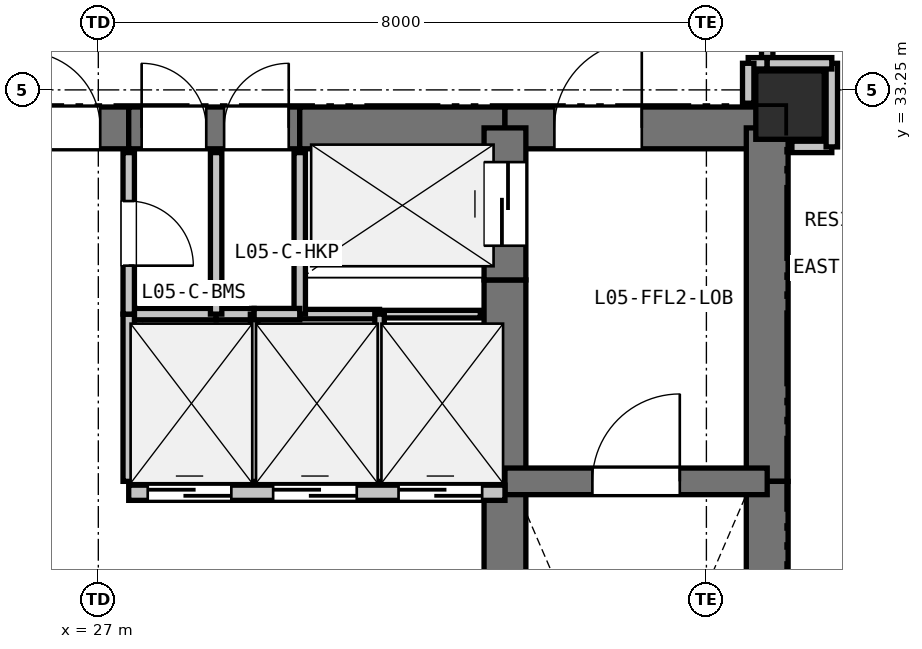
"""IFC4 building model, lengths in metres.
Left out: names, types, materials, properties, quantities, classifications, styles, units other than length and angle.
Written with IfcOpenShell. Run it as: python <this file> out.ifc"""

import sys

from ifc_helpers import new_model, si_unit, direction, frame, frame_2d, origin, origin_2d, place, context, subcontext, project, spatial, rectangle, extrude, element, fill, save


model = new_model("IFC4")
c1 = context("Model", 3, precision=1e-05, world=origin(), true_north=direction((0.0, 1.0)))
c2 = subcontext(c1, "Body", "Model", "MODEL_VIEW")
j1 = project(units=[si_unit("LENGTHUNIT", "METRE"), si_unit("PLANEANGLEUNIT", "RADIAN")], contexts=[c1])
p1 = place(None, origin())
s1 = spatial("IfcSite", under=j1, at=p1, CompositionType="ELEMENT")
p2 = place(p1, origin())
s2 = spatial("IfcBuilding", under=s1, at=p2, CompositionType="ELEMENT")
p3 = place(p2, frame((0.0, 0.0, 22.5)))
s3 = spatial("IfcBuildingStorey", under=s2, at=p3, CompositionType="ELEMENT", Elevation=22.5)
p4 = place(p3, frame((36.1, 33.05, 0.0), z_axis=(0.0, 0.0, 1.0), x_axis=(1.0, 0.0, 0.0)))
e1 = element("IfcColumn", 1, at=p4, inside=s3, PredefinedType="COLUMN", context=c2, shape_type="SweptSolid", body=[
    extrude(rectangle(XDim=0.9, YDim=0.9, at=origin_2d()), origin(), (0.0, 0.0, 1.0), 3.3),
])
p5 = place(p3, frame((25.65, 32.75, 0.0), z_axis=(0.0, 0.0, 1.0), x_axis=(1.0, 0.0, 0.0)))
e2 = element("IfcWall", 2, at=p5, inside=s3, PredefinedType="SHEAR", context=c2, shape_type="SweptSolid", body=[
    extrude(rectangle(XDim=1.75, YDim=0.55, at=frame_2d((0.875, 0.0))), origin(), (0.0, 0.0, 1.0), 3.04),
])
p6 = place(p5, frame((0.375, 0.0, 0.0)))
e3 = element("IfcOpeningElement", 3, at=p6, cuts=e2, PredefinedType="OPENING", context=c2, shape_type="SweptSolid", body=[
    extrude(rectangle(XDim=1.0, YDim=2.15, at=frame_2d((0.5, 1.075))), frame((0.0, 0.285, 0.0), z_axis=(0.0, -1.0, 0.0), x_axis=(1.0, 0.0, 0.0)), (0.0, 0.0, 1.0), 0.57),
])
p7 = place(p3, frame((27.4, 32.75, 0.0), z_axis=(0.0, 0.0, 1.0), x_axis=(1.0, 0.0, 0.0)))
e4 = element("IfcWall", 4, at=p7, inside=s3, PredefinedType="SHEAR", context=c2, shape_type="SweptSolid", body=[
    extrude(rectangle(XDim=2.25, YDim=0.55, at=frame_2d((1.125, 0.0))), origin(), (0.0, 0.0, 1.0), 3.04),
])
p8 = place(p7, frame((0.17, 0.0, 0.0)))
e5 = element("IfcOpeningElement", 5, at=p8, cuts=e4, PredefinedType="OPENING", context=c2, shape_type="SweptSolid", body=[
    extrude(rectangle(XDim=0.85, YDim=2.1, at=frame_2d((0.425, 1.05))), frame((0.0, 0.285, 0.0), z_axis=(0.0, -1.0, 0.0), x_axis=(1.0, 0.0, 0.0)), (0.0, 0.0, 1.0), 0.57),
])
p9 = place(p7, frame((1.255, 0.0, 0.0)))
e6 = element("IfcOpeningElement", 6, at=p9, cuts=e4, PredefinedType="OPENING", context=c2, shape_type="SweptSolid", body=[
    extrude(rectangle(XDim=0.85, YDim=2.1, at=frame_2d((0.425, 1.05))), frame((0.0, 0.285, 0.0), z_axis=(0.0, -1.0, 0.0), x_axis=(1.0, 0.0, 0.0)), (0.0, 0.0, 1.0), 0.57),
])
p10 = place(p3, frame((29.65, 32.75, 0.0), z_axis=(0.0, 0.0, 1.0), x_axis=(1.0, 0.0, 0.0)))
e7 = element("IfcWall", 7, at=p10, inside=s3, PredefinedType="SHEAR", context=c2, shape_type="SweptSolid", body=[
    extrude(rectangle(XDim=2.7, YDim=0.55, at=frame_2d((1.35, 0.0))), origin(), (0.0, 0.0, 1.0), 3.04),
])
p11 = place(p3, frame((32.35, 32.75, 0.0), z_axis=(0.0, 0.0, 1.0), x_axis=(1.0, 0.0, 0.0)))
e8 = element("IfcWall", 8, at=p11, inside=s3, PredefinedType="SHEAR", context=c2, shape_type="SweptSolid", body=[
    extrude(rectangle(XDim=3.45, YDim=0.55, at=frame_2d((1.725, 0.0))), origin(), (0.0, 0.0, 1.0), 3.04),
])
p12 = place(p11, frame((0.65, 0.0, 0.0)))
e9 = element("IfcOpeningElement", 9, at=p12, cuts=e8, PredefinedType="OPENING", context=c2, shape_type="SweptSolid", body=[
    extrude(rectangle(XDim=1.15, YDim=2.15, at=frame_2d((0.575, 1.075))), frame((0.0, 0.285, 0.0), z_axis=(0.0, -1.0, 0.0), x_axis=(1.0, 0.0, 0.0)), (0.0, 0.0, 1.0), 0.57),
])
p13 = place(p3, frame((35.8, 32.75, 0.0), z_axis=(0.0, 0.0, 1.0), x_axis=(0.0, -1.0, 0.0)))
e10 = element("IfcWall", 10, at=p13, inside=s3, PredefinedType="SHEAR", context=c2, shape_type="SweptSolid", body=[
    extrude(rectangle(XDim=4.65, YDim=0.55, at=frame_2d((2.325, 0.0))), origin(), (0.0, 0.0, 1.0), 3.04),
])
p14 = place(p3, frame((35.8, 28.1, 0.0), z_axis=(0.0, 0.0, 1.0), x_axis=(0.0, -1.0, 0.0)))
e11 = element("IfcWall", 11, at=p14, inside=s3, PredefinedType="SHEAR", context=c2, shape_type="SweptSolid", body=[
    extrude(rectangle(XDim=7.35, YDim=0.55, at=frame_2d((3.675, 0.0))), origin(), (0.0, 0.0, 1.0), 3.04),
])
p15 = place(p3, frame((32.35, 25.55, 0.0), z_axis=(0.0, 0.0, 1.0), x_axis=(0.0, 1.0, 0.0)))
e12 = element("IfcWall", 12, at=p15, inside=s3, PredefinedType="SHEAR", context=c2, shape_type="SweptSolid", body=[
    extrude(rectangle(XDim=2.4, YDim=0.55, at=frame_2d((1.2, 0.0))), origin(), (0.0, 0.0, 1.0), 3.04),
])
p16 = place(p3, frame((32.35, 27.95, 0.0), z_axis=(0.0, 0.0, 1.0), x_axis=(0.0, 1.0, 0.0)))
e13 = element("IfcWall", 13, at=p16, inside=s3, PredefinedType="SHEAR", context=c2, shape_type="SweptSolid", body=[
    extrude(rectangle(XDim=2.8, YDim=0.55, at=frame_2d((1.4, 0.0))), origin(), (0.0, 0.0, 1.0), 3.04),
])
p17 = place(p3, frame((32.35, 30.75, 0.0), z_axis=(0.0, 0.0, 1.0), x_axis=(0.0, 1.0, 0.0)))
e14 = element("IfcWall", 14, at=p17, inside=s3, PredefinedType="SHEAR", context=c2, shape_type="SweptSolid", body=[
    extrude(rectangle(XDim=2.0, YDim=0.55, at=frame_2d((1.0, 0.0))), origin(), (0.0, 0.0, 1.0), 3.04),
])
p18 = place(p17, frame((0.45, 0.0, 0.0)))
e15 = element("IfcOpeningElement", 15, at=p18, cuts=e14, PredefinedType="OPENING", context=c2, shape_type="SweptSolid", body=[
    extrude(rectangle(XDim=1.1, YDim=2.15, at=frame_2d((0.55, 1.075))), frame((0.0, 0.285, 0.0), z_axis=(0.0, -1.0, 0.0), x_axis=(1.0, 0.0, 0.0)), (0.0, 0.0, 1.0), 0.57),
])
p19 = place(p3, frame((32.35, 28.1, 0.0), z_axis=(0.0, 0.0, 1.0), x_axis=(1.0, 0.0, 0.0)))
e16 = element("IfcWall", 16, at=p19, inside=s3, PredefinedType="SHEAR", context=c2, shape_type="SweptSolid", body=[
    extrude(rectangle(XDim=3.45, YDim=0.35, at=frame_2d((1.725, 0.0))), origin(), (0.0, 0.0, 1.0), 3.04),
])
p20 = place(p19, frame((1.15, 0.0, 0.0)))
e17 = element("IfcOpeningElement", 17, at=p20, cuts=e16, PredefinedType="OPENING", context=c2, shape_type="SweptSolid", body=[
    extrude(rectangle(XDim=1.15, YDim=2.15, at=frame_2d((0.575, 1.075))), frame((0.0, 0.185, 0.0), z_axis=(0.0, -1.0, 0.0), x_axis=(1.0, 0.0, 0.0)), (0.0, 0.0, 1.0), 0.37),
])
p21 = place(p3, frame((27.4, 27.95, 0.0), z_axis=(0.0, 0.0, 1.0), x_axis=(1.0, 0.0, 0.0)))
e18 = element("IfcWall", 18, at=p21, inside=s3, PredefinedType="PARTITIONING", context=c2, shape_type="SweptSolid", body=[
    extrude(rectangle(XDim=4.95, YDim=0.2, at=frame_2d((2.475, 0.0))), origin(), (0.0, 0.0, 1.0), 3.04),
])
p22 = place(p21, frame((0.25, 0.0, 0.0)))
e19 = element("IfcOpeningElement", 19, at=p22, cuts=e18, PredefinedType="OPENING", context=c2, shape_type="SweptSolid", body=[
    extrude(rectangle(XDim=1.1, YDim=2.15, at=frame_2d((0.55, 1.075))), frame((0.0, 0.11, 0.0), z_axis=(0.0, -1.0, 0.0), x_axis=(1.0, 0.0, 0.0)), (0.0, 0.0, 1.0), 0.22),
])
p23 = place(p21, frame((1.9, 0.0, 0.0)))
e20 = element("IfcOpeningElement", 20, at=p23, cuts=e18, PredefinedType="OPENING", context=c2, shape_type="SweptSolid", body=[
    extrude(rectangle(XDim=1.1, YDim=2.15, at=frame_2d((0.55, 1.075))), frame((0.0, 0.11, 0.0), z_axis=(0.0, -1.0, 0.0), x_axis=(1.0, 0.0, 0.0)), (0.0, 0.0, 1.0), 0.22),
])
p24 = place(p21, frame((3.55, 0.0, 0.0)))
e21 = element("IfcOpeningElement", 21, at=p24, cuts=e18, PredefinedType="OPENING", context=c2, shape_type="SweptSolid", body=[
    extrude(rectangle(XDim=1.1, YDim=2.15, at=frame_2d((0.55, 1.075))), frame((0.0, 0.11, 0.0), z_axis=(0.0, -1.0, 0.0), x_axis=(1.0, 0.0, 0.0)), (0.0, 0.0, 1.0), 0.22),
])
p25 = place(p3, frame((32.025, 30.3, 0.0), z_axis=(0.0, 0.0, 1.0), x_axis=(-1.0, 0.0, 0.0)))
e22 = element("IfcWall", 22, at=p25, inside=s3, PredefinedType="PARTITIONING", context=c2, shape_type="SweptSolid", body=[
    extrude(rectangle(XDim=1.325, YDim=0.1, at=frame_2d((0.663, 0.0))), origin(), (0.0, 0.0, 1.0), 3.04),
])
p26 = place(p3, frame((30.7, 30.3, 0.0), z_axis=(0.0, 0.0, 1.0), x_axis=(-1.0, 0.0, 0.0)))
e23 = element("IfcWall", 23, at=p26, inside=s3, PredefinedType="PARTITIONING", context=c2, shape_type="SweptSolid", body=[
    extrude(rectangle(XDim=1.05, YDim=0.125, at=frame_2d((0.525, 0.0))), origin(), (0.0, 0.0, 1.0), 3.04),
])
p27 = place(p3, frame((29.65, 30.3, 0.0), z_axis=(0.0, 0.0, 1.0), x_axis=(0.0, 1.0, 0.0)))
e24 = element("IfcWall", 24, at=p27, inside=s3, PredefinedType="PARTITIONING", context=c2, shape_type="SweptSolid", body=[
    extrude(rectangle(XDim=2.125, YDim=0.15, at=frame_2d((1.062, 0.0))), origin(), (0.0, 0.0, 1.0), 3.04),
])
p28 = place(p3, frame((27.4, 30.3, 0.0), z_axis=(0.0, 0.0, 1.0), x_axis=(1.0, 0.0, 0.0)))
e25 = element("IfcWall", 25, at=p28, inside=s3, PredefinedType="PARTITIONING", context=c2, shape_type="SweptSolid", body=[
    extrude(rectangle(XDim=1.15, YDim=0.15, at=frame_2d((0.575, 0.0))), origin(), (0.0, 0.0, 1.0), 3.04),
])
p29 = place(p3, frame((28.55, 30.3, 0.0), z_axis=(0.0, 0.0, 1.0), x_axis=(1.0, 0.0, 0.0)))
e26 = element("IfcWall", 26, at=p29, inside=s3, PredefinedType="PARTITIONING", context=c2, shape_type="SweptSolid", body=[
    extrude(rectangle(XDim=0.5, YDim=0.15, at=frame_2d((0.25, 0.0))), origin(), (0.0, 0.0, 1.0), 3.04),
])
p30 = place(p3, frame((29.05, 30.3, 0.0), z_axis=(0.0, 0.0, 1.0), x_axis=(0.0, -1.0, 0.0)))
e27 = element("IfcWall", 27, at=p30, inside=s3, PredefinedType="PARTITIONING", context=c2, shape_type="SweptSolid", body=[
    extrude(rectangle(XDim=2.2, YDim=0.1, at=frame_2d((1.1, 0.0))), origin(), (0.0, 0.0, 1.0), 3.04),
])
p31 = place(p3, frame((27.4, 28.1, 0.0), z_axis=(0.0, 0.0, 1.0), x_axis=(0.0, 1.0, 0.0)))
e28 = element("IfcWall", 28, at=p31, inside=s3, PredefinedType="PARTITIONING", context=c2, shape_type="SweptSolid", body=[
    extrude(rectangle(XDim=2.2, YDim=0.15, at=frame_2d((1.1, 0.0))), origin(), (0.0, 0.0, 1.0), 3.04),
])
p32 = place(p3, frame((29.05, 30.3, 0.0), z_axis=(0.0, 0.0, 1.0), x_axis=(1.0, 0.0, 0.0)))
e29 = element("IfcWall", 29, at=p32, inside=s3, PredefinedType="PARTITIONING", context=c2, shape_type="SweptSolid", body=[
    extrude(rectangle(XDim=0.6, YDim=0.15, at=frame_2d((0.3, 0.0))), origin(), (0.0, 0.0, 1.0), 3.04),
])
p33 = place(p3, frame((30.7, 30.3, 0.0), z_axis=(0.0, 0.0, 1.0), x_axis=(0.0, -1.0, 0.0)))
e30 = element("IfcWall", 30, at=p33, inside=s3, PredefinedType="PARTITIONING", context=c2, shape_type="SweptSolid", body=[
    extrude(rectangle(XDim=2.2, YDim=0.125, at=frame_2d((1.1, 0.0))), origin(), (0.0, 0.0, 1.0), 3.04),
])
p34 = place(p3, frame((27.4, 32.425, 0.0), z_axis=(0.0, 0.0, 1.0), x_axis=(0.0, -1.0, 0.0)))
e31 = element("IfcWall", 31, at=p34, inside=s3, PredefinedType="PARTITIONING", context=c2, shape_type="SweptSolid", body=[
    extrude(rectangle(XDim=2.125, YDim=0.15, at=frame_2d((1.062, 0.0))), origin(), (0.0, 0.0, 1.0), 3.04),
])
p35 = place(p34, frame((0.637, 0.0, 0.0)))
e32 = element("IfcOpeningElement", 32, at=p35, cuts=e31, PredefinedType="OPENING", context=c2, shape_type="SweptSolid", body=[
    extrude(rectangle(XDim=0.85, YDim=2.1, at=frame_2d((0.425, 1.05))), frame((0.0, 0.085, 0.0), z_axis=(0.0, -1.0, 0.0), x_axis=(1.0, 0.0, 0.0)), (0.0, 0.0, 1.0), 0.17),
])
p36 = place(p3, frame((35.8, 35.35, 0.0), z_axis=(0.0, 0.0, 1.0), x_axis=(0.0, -1.0, 0.0)))
e33 = element("IfcWall", 33, at=p36, inside=s3, PredefinedType="PARTITIONING", context=c2, shape_type="SweptSolid", body=[
    extrude(rectangle(XDim=1.75, YDim=0.15, at=frame_2d((0.875, 0.0))), origin(), (0.0, 0.0, 1.0), 3.04),
])
p37 = place(p36, frame((0.375, 0.0, 0.0)))
e34 = element("IfcOpeningElement", 34, at=p37, cuts=e33, PredefinedType="OPENING", context=c2, shape_type="SweptSolid", body=[
    extrude(rectangle(XDim=1.0, YDim=2.15, at=frame_2d((0.5, 1.075))), frame((0.0, 0.085, 0.0), z_axis=(0.0, -1.0, 0.0), x_axis=(1.0, 0.0, 0.0)), (0.0, 0.0, 1.0), 0.17),
])
p38 = place(p3, frame((35.8, 33.6, 0.0), z_axis=(0.0, 0.0, 1.0), x_axis=(-1.0, 0.0, 0.0)))
e35 = element("IfcWall", 35, at=p38, inside=s3, PredefinedType="PARTITIONING", context=c2, shape_type="SweptSolid", body=[
    extrude(rectangle(XDim=0.25, YDim=0.15, at=frame_2d((0.125, 0.0))), origin(), (0.0, 0.0, 1.0), 3.04),
])
p39 = place(p3, frame((35.55, 33.6, 0.0), z_axis=(0.0, 0.0, 1.0), x_axis=(0.0, -1.0, 0.0)))
e36 = element("IfcWall", 36, at=p39, inside=s3, PredefinedType="PARTITIONING", context=c2, shape_type="SweptSolid", body=[
    extrude(rectangle(XDim=0.525, YDim=0.15, at=frame_2d((0.263, 0.0))), origin(), (0.0, 0.0, 1.0), 2.488),
])
p40 = place(p3, frame((36.125, 32.5, 0.0), z_axis=(0.0, 0.0, 1.0), x_axis=(1.0, 0.0, 0.0)))
e37 = element("IfcWall", 37, at=p40, inside=s3, PredefinedType="PARTITIONING", context=c2, shape_type="SweptSolid", body=[
    extrude(rectangle(XDim=0.525, YDim=0.15, at=frame_2d((0.262, 0.0))), origin(), (0.0, 0.0, 1.0), 2.488),
])
p41 = place(p3, frame((36.65, 32.5, 0.0), z_axis=(0.0, 0.0, 1.0), x_axis=(0.0, 1.0, 0.0)))
e38 = element("IfcWall", 38, at=p41, inside=s3, PredefinedType="PARTITIONING", context=c2, shape_type="SweptSolid", body=[
    extrude(rectangle(XDim=1.1, YDim=0.15, at=frame_2d((0.55, 0.0))), origin(), (0.0, 0.0, 1.0), 2.337),
])
p42 = place(p3, frame((36.65, 33.6, 0.0), z_axis=(0.0, 0.0, 1.0), x_axis=(-1.0, 0.0, 0.0)))
e39 = element("IfcWall", 39, at=p42, inside=s3, PredefinedType="PARTITIONING", context=c2, shape_type="SweptSolid", body=[
    extrude(rectangle(XDim=0.85, YDim=0.15, at=frame_2d((0.425, 0.0))), origin(), (0.0, 0.0, 1.0), 2.337),
])
p43 = place(p3, frame((28.55, 32.425, 0.0), z_axis=(0.0, 0.0, 1.0), x_axis=(0.0, -1.0, 0.0)))
e40 = element("IfcWall", 40, at=p43, inside=s3, PredefinedType="PARTITIONING", context=c2, shape_type="SweptSolid", body=[
    extrude(rectangle(XDim=2.125, YDim=0.15, at=frame_2d((1.062, 0.0))), origin(), (0.0, 0.0, 1.0), 3.04),
])
p44 = place(p22, origin())
e41 = element("IfcDoor", 41, at=p44, inside=s3, OperationType="SLIDING_TO_LEFT", PredefinedType="DOOR", context=c2, shape_type="SweptSolid", body=[
    extrude(rectangle(XDim=1.1, YDim=2.15, at=frame_2d((0.55, 1.075))), frame((0.0, 0.025, 0.0), z_axis=(0.0, -1.0, 0.0), x_axis=(1.0, 0.0, 0.0)), (0.0, 0.0, 1.0), 0.05),
])
fill(e19, e41)
p45 = place(p23, origin())
e42 = element("IfcDoor", 42, at=p45, inside=s3, OperationType="SLIDING_TO_LEFT", PredefinedType="DOOR", context=c2, shape_type="SweptSolid", body=[
    extrude(rectangle(XDim=1.1, YDim=2.15, at=frame_2d((0.55, 1.075))), frame((0.0, 0.025, 0.0), z_axis=(0.0, -1.0, 0.0), x_axis=(1.0, 0.0, 0.0)), (0.0, 0.0, 1.0), 0.05),
])
fill(e20, e42)
p46 = place(p24, origin())
e43 = element("IfcDoor", 43, at=p46, inside=s3, OperationType="SLIDING_TO_LEFT", PredefinedType="DOOR", context=c2, shape_type="SweptSolid", body=[
    extrude(rectangle(XDim=1.1, YDim=2.15, at=frame_2d((0.55, 1.075))), frame((0.0, 0.025, 0.0), z_axis=(0.0, -1.0, 0.0), x_axis=(1.0, 0.0, 0.0)), (0.0, 0.0, 1.0), 0.05),
])
fill(e21, e43)
p47 = place(p6, origin())
e44 = element("IfcDoor", 44, at=p47, inside=s3, OperationType="SINGLE_SWING_LEFT", PredefinedType="DOOR", context=c2, shape_type="SweptSolid", body=[
    extrude(rectangle(XDim=1.0, YDim=2.15, at=frame_2d((0.5, 1.075))), frame((0.0, 0.025, 0.0), z_axis=(0.0, -1.0, 0.0), x_axis=(1.0, 0.0, 0.0)), (0.0, 0.0, 1.0), 0.05),
])
fill(e3, e44)
p48 = place(p18, origin())
e45 = element("IfcDoor", 45, at=p48, inside=s3, OperationType="SLIDING_TO_LEFT", PredefinedType="DOOR", context=c2, shape_type="SweptSolid", body=[
    extrude(rectangle(XDim=1.1, YDim=2.15, at=frame_2d((0.55, 1.075))), frame((0.0, 0.025, 0.0), z_axis=(0.0, -1.0, 0.0), x_axis=(1.0, 0.0, 0.0)), (0.0, 0.0, 1.0), 0.05),
])
fill(e15, e45)
p49 = place(p20, origin())
e46 = element("IfcDoor", 46, at=p49, inside=s3, OperationType="SINGLE_SWING_RIGHT", PredefinedType="DOOR", context=c2, shape_type="SweptSolid", body=[
    extrude(rectangle(XDim=1.15, YDim=2.15, at=frame_2d((0.575, 1.075))), frame((0.0, 0.025, 0.0), z_axis=(0.0, -1.0, 0.0), x_axis=(1.0, 0.0, 0.0)), (0.0, 0.0, 1.0), 0.05),
])
fill(e17, e46)
p50 = place(p12, origin())
e47 = element("IfcDoor", 47, at=p50, inside=s3, OperationType="SINGLE_SWING_RIGHT", PredefinedType="DOOR", context=c2, shape_type="SweptSolid", body=[
    extrude(rectangle(XDim=1.15, YDim=2.15, at=frame_2d((0.575, 1.075))), frame((0.0, 0.025, 0.0), z_axis=(0.0, -1.0, 0.0), x_axis=(1.0, 0.0, 0.0)), (0.0, 0.0, 1.0), 0.05),
])
fill(e9, e47)
p51 = place(p35, origin())
e48 = element("IfcDoor", 48, at=p51, inside=s3, OperationType="SINGLE_SWING_RIGHT", PredefinedType="DOOR", context=c2, shape_type="SweptSolid", body=[
    extrude(rectangle(XDim=0.85, YDim=2.1, at=frame_2d((0.425, 1.05))), frame((0.0, 0.025, 0.0), z_axis=(0.0, -1.0, 0.0), x_axis=(1.0, 0.0, 0.0)), (0.0, 0.0, 1.0), 0.05),
])
fill(e32, e48)
p52 = place(p8, origin())
e49 = element("IfcDoor", 49, at=p52, inside=s3, OperationType="SINGLE_SWING_LEFT", PredefinedType="DOOR", context=c2, shape_type="SweptSolid", body=[
    extrude(rectangle(XDim=0.85, YDim=2.1, at=frame_2d((0.425, 1.05))), frame((0.0, 0.025, 0.0), z_axis=(0.0, -1.0, 0.0), x_axis=(1.0, 0.0, 0.0)), (0.0, 0.0, 1.0), 0.05),
])
fill(e5, e49)
p53 = place(p9, origin())
e50 = element("IfcDoor", 50, at=p53, inside=s3, OperationType="SINGLE_SWING_RIGHT", PredefinedType="DOOR", context=c2, shape_type="SweptSolid", body=[
    extrude(rectangle(XDim=0.85, YDim=2.1, at=frame_2d((0.425, 1.05))), frame((0.0, 0.025, 0.0), z_axis=(0.0, -1.0, 0.0), x_axis=(1.0, 0.0, 0.0)), (0.0, 0.0, 1.0), 0.05),
])
fill(e6, e50)
save(model, sys.argv[1])
